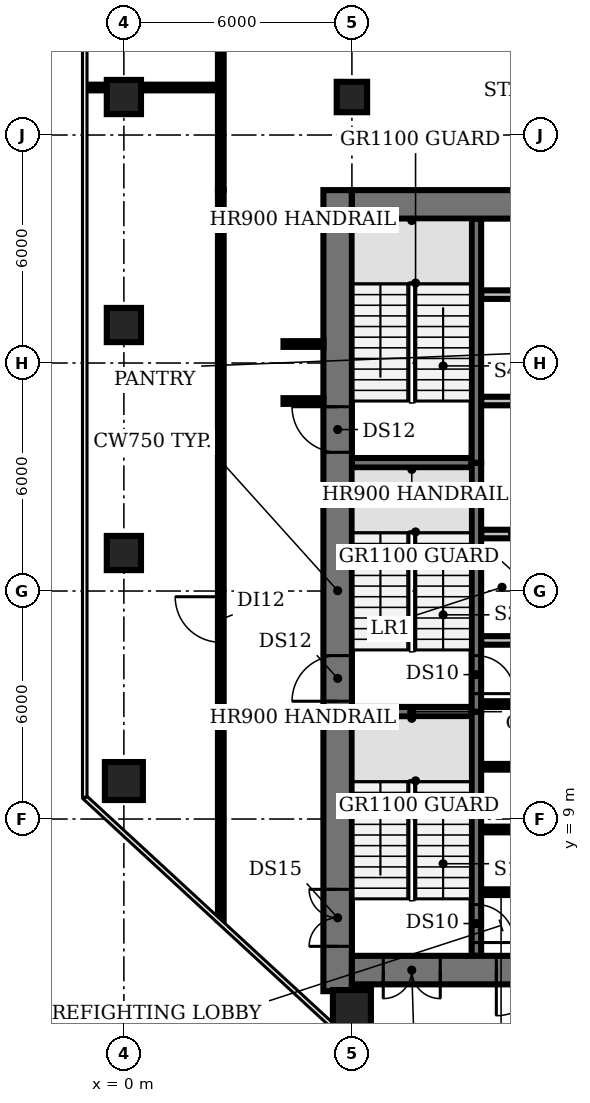
"""IFC4 building model, lengths in metres.
Left out: names, types, materials, properties, quantities, classifications, styles, units other than length and angle.
Written with IfcOpenShell. Run it as: python <this file> out.ifc"""

import sys

from ifc_helpers import new_model, si_unit, direction, frame, frame_2d, origin, origin_2d, place, context, subcontext, project, spatial, rectangle, circle, extrude, element, fill, save


model = new_model("IFC4")
c1 = context("Model", 3, precision=1e-05, world=origin(), true_north=direction((0.0, 1.0)))
c2 = subcontext(c1, "Body", "Model", "MODEL_VIEW")
j1 = project(units=[si_unit("LENGTHUNIT", "METRE"), si_unit("PLANEANGLEUNIT", "RADIAN")], contexts=[c1])
p1 = place(None, origin())
s1 = spatial("IfcSite", under=j1, at=p1, CompositionType="ELEMENT")
p2 = place(p1, origin())
s2 = spatial("IfcBuilding", under=s1, at=p2, CompositionType="ELEMENT")
p3 = place(p2, frame((0.0, 0.0, 100.4)))
s3 = spatial("IfcBuildingStorey", under=s2, at=p3, CompositionType="ELEMENT", Elevation=100.4)
p4 = place(p3, frame((0.0, 10.0, 0.0), z_axis=(0.0, 0.0, 1.0), x_axis=(1.0, 0.0, 0.0)))
e1 = element("IfcColumn", 1, at=p4, inside=s3, PredefinedType="COLUMN", context=c2, shape_type="SweptSolid", body=[
    extrude(circle(Radius=0.5, at=origin_2d()), origin(), (0.0, 0.0, 1.0), 3.85),
])
for number, where, z_axis, x_axis in (
    (2, (0.0, 16.0, 0.0), (0.0, 0.0, 1.0), (1.0, 0.0, 0.0)),
    (3, (0.0, 22.0, 0.0), (0.0, 0.0, 1.0), (1.0, 0.0, 0.0)),
    (4, (0.0, 28.0, 0.0), (0.0, 0.0, 1.0), (1.0, 0.0, 0.0)),
):
    element("IfcColumn", number, at=place(p3, frame(where, z_axis=z_axis, x_axis=x_axis)), inside=s3, PredefinedType="COLUMN", context=c2, shape_type="SweptSolid", body=[
        extrude(rectangle(XDim=0.9, YDim=0.9, at=origin_2d()), origin(), (0.0, 0.0, 1.0), 3.85),
    ])
p5 = place(p3, frame((6.0, 4.0, 0.0), z_axis=(0.0, 0.0, 1.0), x_axis=(1.0, 0.0, 0.0)))
e5 = element("IfcColumn", 5, at=p5, inside=s3, PredefinedType="COLUMN", context=c2, shape_type="SweptSolid", body=[
    extrude(circle(Radius=0.5, at=origin_2d()), origin(), (0.0, 0.0, 1.0), 3.85),
])
p6 = place(p3, frame((6.0, 28.0, 0.0), z_axis=(0.0, 0.0, 1.0), x_axis=(1.0, 0.0, 0.0)))
e6 = element("IfcColumn", 6, at=p6, inside=s3, PredefinedType="COLUMN", context=c2, shape_type="SweptSolid", body=[
    extrude(rectangle(XDim=0.8, YDim=0.8, at=origin_2d()), origin(), (0.0, 0.0, 1.0), 3.85),
])
for number, where, z_axis, x_axis in (
    (7, (9.4, 7.075, 0.0), (0.0, 0.0, 1.0), (1.0, 0.0, 0.0)),
    (8, (9.4, 8.725, 0.0), (0.0, 0.0, 1.0), (1.0, 0.0, 0.0)),
    (9, (9.4, 10.375, 0.0), (0.0, 0.0, 1.0), (1.0, 0.0, 0.0)),
):
    element("IfcWall", number, at=place(p3, frame(where, z_axis=z_axis, x_axis=x_axis)), inside=s3, PredefinedType="SHEAR", context=c2, shape_type="SweptSolid", body=[
        extrude(rectangle(XDim=1.05, YDim=0.15, at=frame_2d((0.525, 0.0))), origin(), (0.0, 0.0, 1.0), 3.85),
    ])
p7 = place(p3, frame((6.0, 11.825, 0.0), z_axis=(0.0, 0.0, 1.0), x_axis=(1.0, 0.0, 0.0)))
e10 = element("IfcWall", 10, at=p7, inside=s3, PredefinedType="SHEAR", context=c2, shape_type="SweptSolid", body=[
    extrude(rectangle(XDim=3.15, YDim=0.25, at=frame_2d((1.575, 0.0))), origin(), (0.0, 0.0, 1.0), 3.85),
])
p8 = place(p3, frame((9.4, 12.025, 0.0), z_axis=(0.0, 0.0, 1.0), x_axis=(1.0, 0.0, 0.0)))
e11 = element("IfcWall", 11, at=p8, inside=s3, PredefinedType="SHEAR", context=c2, shape_type="SweptSolid", body=[
    extrude(rectangle(XDim=1.05, YDim=0.15, at=frame_2d((0.525, 0.0))), origin(), (0.0, 0.0, 1.0), 3.85),
])
p9 = place(p3, frame((9.4, 13.7, 0.0), z_axis=(0.0, 0.0, 1.0), x_axis=(1.0, 0.0, 0.0)))
e12 = element("IfcWall", 12, at=p9, inside=s3, PredefinedType="PARTITIONING", context=c2, shape_type="SweptSolid", body=[
    extrude(rectangle(XDim=4.0, YDim=0.225, at=frame_2d((2.0, 0.0))), origin(), (0.0, 0.0, 1.0), 3.85),
])
p10 = place(p3, frame((9.4, 16.5, 0.0), z_axis=(0.0, 0.0, 1.0), x_axis=(1.0, 0.0, 0.0)))
e13 = element("IfcWall", 13, at=p10, inside=s3, PredefinedType="PARTITIONING", context=c2, shape_type="SweptSolid", body=[
    extrude(rectangle(XDim=14.6, YDim=0.225, at=frame_2d((7.3, 0.0))), origin(), (0.0, 0.0, 1.0), 3.85),
])
p11 = place(p10, frame((0.75, 0.0, 0.0)))
e14 = element("IfcOpeningElement", 14, at=p11, cuts=e13, PredefinedType="OPENING", context=c2, shape_type="SweptSolid", body=[
    extrude(rectangle(XDim=1.1, YDim=2.1, at=frame_2d((0.55, 1.05))), frame((0.0, 0.123, 0.0), z_axis=(0.0, -1.0, 0.0), x_axis=(1.0, 0.0, 0.0)), (0.0, 0.0, 1.0), 0.245),
])
p12 = place(p10, frame((3.55, 0.0, 0.0)))
e15 = element("IfcOpeningElement", 15, at=p12, cuts=e13, PredefinedType="OPENING", context=c2, shape_type="SweptSolid", body=[
    extrude(rectangle(XDim=1.1, YDim=2.1, at=frame_2d((0.55, 1.05))), frame((0.0, 0.123, 0.0), z_axis=(0.0, -1.0, 0.0), x_axis=(1.0, 0.0, 0.0)), (0.0, 0.0, 1.0), 0.245),
])
p13 = place(p10, frame((6.35, 0.0, 0.0)))
e16 = element("IfcOpeningElement", 16, at=p13, cuts=e13, PredefinedType="OPENING", context=c2, shape_type="SweptSolid", body=[
    extrude(rectangle(XDim=1.1, YDim=2.1, at=frame_2d((0.55, 1.05))), frame((0.0, 0.123, 0.0), z_axis=(0.0, -1.0, 0.0), x_axis=(1.0, 0.0, 0.0)), (0.0, 0.0, 1.0), 0.245),
])
p14 = place(p10, frame((9.15, 0.0, 0.0)))
e17 = element("IfcOpeningElement", 17, at=p14, cuts=e13, PredefinedType="OPENING", context=c2, shape_type="SweptSolid", body=[
    extrude(rectangle(XDim=1.1, YDim=2.1, at=frame_2d((0.55, 1.05))), frame((0.0, 0.123, 0.0), z_axis=(0.0, -1.0, 0.0), x_axis=(1.0, 0.0, 0.0)), (0.0, 0.0, 1.0), 0.245),
])
p15 = place(p10, frame((11.647, 0.0, 0.0)))
e18 = element("IfcOpeningElement", 18, at=p15, cuts=e13, PredefinedType="OPENING", context=c2, shape_type="SweptSolid", body=[
    extrude(rectangle(XDim=0.9, YDim=2.1, at=frame_2d((0.45, 1.05))), frame((0.0, 0.123, 0.0), z_axis=(0.0, -1.0, 0.0), x_axis=(1.0, 0.0, 0.0)), (0.0, 0.0, 1.0), 0.245),
])
p16 = place(p10, frame((13.423, 0.0, 0.0)))
e19 = element("IfcOpeningElement", 19, at=p16, cuts=e13, PredefinedType="OPENING", context=c2, shape_type="SweptSolid", body=[
    extrude(rectangle(XDim=0.9, YDim=2.1, at=frame_2d((0.45, 1.05))), frame((0.0, 0.123, 0.0), z_axis=(0.0, -1.0, 0.0), x_axis=(1.0, 0.0, 0.0)), (0.0, 0.0, 1.0), 0.245),
])
p17 = place(p3, frame((6.0, 18.375, 0.0), z_axis=(0.0, 0.0, 1.0), x_axis=(1.0, 0.0, 0.0)))
e20 = element("IfcWall", 20, at=p17, inside=s3, PredefinedType="SHEAR", context=c2, shape_type="SweptSolid", body=[
    extrude(rectangle(XDim=3.15, YDim=0.25, at=frame_2d((1.575, 0.0))), origin(), (0.0, 0.0, 1.0), 3.85),
])
p18 = place(p3, frame((24.0, 20.0, 0.0), z_axis=(0.0, 0.0, 1.0), x_axis=(-1.0, 0.0, 0.0)))
e21 = element("IfcWall", 21, at=p18, inside=s3, PredefinedType="PARTITIONING", context=c2, shape_type="SweptSolid", body=[
    extrude(rectangle(XDim=14.6, YDim=0.225, at=frame_2d((7.3, 0.0))), origin(), (0.0, 0.0, 1.0), 3.85),
])
p19 = place(p18, frame((12.9, 0.0, 0.0)))
e22 = element("IfcOpeningElement", 22, at=p19, cuts=e21, PredefinedType="OPENING", context=c2, shape_type="SweptSolid", body=[
    extrude(rectangle(XDim=0.9, YDim=2.1, at=frame_2d((0.45, 1.05))), frame((0.0, 0.123, 0.0), z_axis=(0.0, -1.0, 0.0), x_axis=(1.0, 0.0, 0.0)), (0.0, 0.0, 1.0), 0.245),
])
p20 = place(p18, frame((9.475, 0.0, 0.0)))
e23 = element("IfcOpeningElement", 23, at=p20, cuts=e21, PredefinedType="OPENING", context=c2, shape_type="SweptSolid", body=[
    extrude(rectangle(XDim=1.0, YDim=2.1, at=frame_2d((0.5, 1.05))), frame((0.0, 0.123, 0.0), z_axis=(0.0, -1.0, 0.0), x_axis=(1.0, 0.0, 0.0)), (0.0, 0.0, 1.0), 0.245),
])
p21 = place(p18, frame((6.375, 0.0, 0.0)))
e24 = element("IfcOpeningElement", 24, at=p21, cuts=e21, PredefinedType="OPENING", context=c2, shape_type="SweptSolid", body=[
    extrude(rectangle(XDim=0.9, YDim=2.1, at=frame_2d((0.45, 1.05))), frame((0.0, 0.123, 0.0), z_axis=(0.0, -1.0, 0.0), x_axis=(1.0, 0.0, 0.0)), (0.0, 0.0, 1.0), 0.245),
])
p22 = place(p18, frame((4.175, 0.0, 0.0)))
e25 = element("IfcOpeningElement", 25, at=p22, cuts=e21, PredefinedType="OPENING", context=c2, shape_type="SweptSolid", body=[
    extrude(rectangle(XDim=0.9, YDim=2.1, at=frame_2d((0.45, 1.05))), frame((0.0, 0.123, 0.0), z_axis=(0.0, -1.0, 0.0), x_axis=(1.0, 0.0, 0.0)), (0.0, 0.0, 1.0), 0.245),
])
p23 = place(p18, frame((2.137, 0.0, 0.0)))
e26 = element("IfcOpeningElement", 26, at=p23, cuts=e21, PredefinedType="OPENING", context=c2, shape_type="SweptSolid", body=[
    extrude(rectangle(XDim=0.9, YDim=2.1, at=frame_2d((0.45, 1.05))), frame((0.0, 0.123, 0.0), z_axis=(0.0, -1.0, 0.0), x_axis=(1.0, 0.0, 0.0)), (0.0, 0.0, 1.0), 0.245),
])
p24 = place(p18, frame((0.363, 0.0, 0.0)))
e27 = element("IfcOpeningElement", 27, at=p24, cuts=e21, PredefinedType="OPENING", context=c2, shape_type="SweptSolid", body=[
    extrude(rectangle(XDim=0.9, YDim=2.1, at=frame_2d((0.45, 1.05))), frame((0.0, 0.123, 0.0), z_axis=(0.0, -1.0, 0.0), x_axis=(1.0, 0.0, 0.0)), (0.0, 0.0, 1.0), 0.245),
])
p25 = place(p3, frame((9.4, 22.8, 0.0), z_axis=(0.0, 0.0, 1.0), x_axis=(1.0, 0.0, 0.0)))
e28 = element("IfcWall", 28, at=p25, inside=s3, PredefinedType="PARTITIONING", context=c2, shape_type="SweptSolid", body=[
    extrude(rectangle(XDim=14.6, YDim=0.225, at=frame_2d((7.3, 0.0))), origin(), (0.0, 0.0, 1.0), 3.85),
])
p26 = place(p3, frame((9.275, 11.825, 0.0), z_axis=(0.0, 0.0, 1.0), x_axis=(0.0, -1.0, 0.0)))
e29 = element("IfcWall", 29, at=p26, inside=s3, PredefinedType="SHEAR", context=c2, shape_type="SweptSolid", body=[
    extrude(rectangle(XDim=6.425, YDim=0.25, at=frame_2d((3.212, 0.0))), origin(), (0.0, 0.0, 1.0), 3.85),
])
p27 = place(p26, frame((5.075, 0.0, 0.0)))
e30 = element("IfcOpeningElement", 30, at=p27, cuts=e29, PredefinedType="OPENING", context=c2, shape_type="SweptSolid", body=[
    extrude(rectangle(XDim=1.0, YDim=2.1, at=frame_2d((0.5, 1.05))), frame((0.0, 0.135, 0.0), z_axis=(0.0, -1.0, 0.0), x_axis=(1.0, 0.0, 0.0)), (0.0, 0.0, 1.0), 0.27),
])
p28 = place(p3, frame((9.275, 18.375, 0.0), z_axis=(0.0, 0.0, 1.0), x_axis=(0.0, -1.0, 0.0)))
e31 = element("IfcWall", 31, at=p28, inside=s3, PredefinedType="SHEAR", context=c2, shape_type="SweptSolid", body=[
    extrude(rectangle(XDim=6.55, YDim=0.25, at=frame_2d((3.275, 0.0))), origin(), (0.0, 0.0, 1.0), 3.85),
])
p29 = place(p28, frame((5.075, 0.0, 0.0)))
e32 = element("IfcOpeningElement", 32, at=p29, cuts=e31, PredefinedType="OPENING", context=c2, shape_type="SweptSolid", body=[
    extrude(rectangle(XDim=1.0, YDim=2.1, at=frame_2d((0.5, 1.05))), frame((0.0, 0.135, 0.0), z_axis=(0.0, -1.0, 0.0), x_axis=(1.0, 0.0, 0.0)), (0.0, 0.0, 1.0), 0.27),
])
p30 = place(p3, frame((9.275, 18.375, 0.0), z_axis=(0.0, 0.0, 1.0), x_axis=(0.0, 1.0, 0.0)))
e33 = element("IfcWall", 33, at=p30, inside=s3, PredefinedType="SHEAR", context=c2, shape_type="SweptSolid", body=[
    extrude(rectangle(XDim=6.425, YDim=0.25, at=frame_2d((3.212, 0.0))), origin(), (0.0, 0.0, 1.0), 3.85),
])
p31 = place(p3, frame((5.625, 4.47, 0.0), z_axis=(0.0, 0.0, 1.0), x_axis=(0.0, 1.0, 0.0)))
e34 = element("IfcWall", 34, at=p31, inside=s3, PredefinedType="SHEAR", context=c2, shape_type="SweptSolid", body=[
    extrude(rectangle(XDim=21.08, YDim=0.75, at=frame_2d((10.54, 0.0))), origin(), (0.0, 0.0, 1.0), 3.85),
])
p32 = place(p31, frame((1.18, 0.0, 0.0)))
e35 = element("IfcOpeningElement", 35, at=p32, cuts=e34, PredefinedType="OPENING", context=c2, shape_type="SweptSolid", body=[
    extrude(rectangle(XDim=1.5, YDim=2.1, at=frame_2d((0.75, 1.05))), frame((0.0, 0.385, 0.0), z_axis=(0.0, -1.0, 0.0), x_axis=(1.0, 0.0, 0.0)), (0.0, 0.0, 1.0), 0.77),
])
p33 = place(p31, frame((7.63, 0.0, 0.0)))
e36 = element("IfcOpeningElement", 36, at=p33, cuts=e34, PredefinedType="OPENING", context=c2, shape_type="SweptSolid", body=[
    extrude(rectangle(XDim=1.2, YDim=2.1, at=frame_2d((0.6, 1.05))), frame((0.0, 0.385, 0.0), z_axis=(0.0, -1.0, 0.0), x_axis=(1.0, 0.0, 0.0)), (0.0, 0.0, 1.0), 0.77),
])
p34 = place(p31, frame((14.18, 0.0, 0.0)))
e37 = element("IfcOpeningElement", 37, at=p34, cuts=e34, PredefinedType="OPENING", context=c2, shape_type="SweptSolid", body=[
    extrude(rectangle(XDim=1.2, YDim=2.1, at=frame_2d((0.6, 1.05))), frame((0.0, 0.385, 0.0), z_axis=(0.0, -1.0, 0.0), x_axis=(1.0, 0.0, 0.0)), (0.0, 0.0, 1.0), 0.77),
])
p35 = place(p3, frame((24.0, 5.025, 0.0), z_axis=(0.0, 0.0, 1.0), x_axis=(-1.0, 0.0, 0.0)))
e38 = element("IfcWall", 38, at=p35, inside=s3, PredefinedType="SHEAR", context=c2, shape_type="SweptSolid", body=[
    extrude(rectangle(XDim=18.0, YDim=0.75, at=frame_2d((9.0, 0.0))), origin(), (0.0, 0.0, 1.0), 3.85),
])
p36 = place(p35, frame((0.825, 0.0, 0.0)))
e39 = element("IfcOpeningElement", 39, at=p36, cuts=e38, PredefinedType="OPENING", context=c2, shape_type="SweptSolid", body=[
    extrude(rectangle(XDim=1.5, YDim=2.1, at=frame_2d((0.75, 1.05))), frame((0.0, 0.385, 0.0), z_axis=(0.0, -1.0, 0.0), x_axis=(1.0, 0.0, 0.0)), (0.0, 0.0, 1.0), 0.77),
])
p37 = place(p35, frame((15.675, 0.0, 0.0)))
e40 = element("IfcOpeningElement", 40, at=p37, cuts=e38, PredefinedType="OPENING", context=c2, shape_type="SweptSolid", body=[
    extrude(rectangle(XDim=1.5, YDim=2.1, at=frame_2d((0.75, 1.05))), frame((0.0, 0.385, 0.0), z_axis=(0.0, -1.0, 0.0), x_axis=(1.0, 0.0, 0.0)), (0.0, 0.0, 1.0), 0.77),
])
p38 = place(p35, frame((13.0, 0.0, 0.0)))
e41 = element("IfcOpeningElement", 41, at=p38, cuts=e38, PredefinedType="OPENING", context=c2, shape_type="SweptSolid", body=[
    extrude(rectangle(XDim=1.2, YDim=2.1, at=frame_2d((0.6, 1.05))), frame((0.0, 0.385, 0.0), z_axis=(0.0, -1.0, 0.0), x_axis=(1.0, 0.0, 0.0)), (0.0, 0.0, 1.0), 0.77),
])
p39 = place(p35, frame((4.35, 0.0, 0.0)))
e42 = element("IfcOpeningElement", 42, at=p39, cuts=e38, PredefinedType="OPENING", context=c2, shape_type="SweptSolid", body=[
    extrude(rectangle(XDim=1.0, YDim=2.1, at=frame_2d((0.5, 1.05))), frame((0.0, 0.385, 0.0), z_axis=(0.0, -1.0, 0.0), x_axis=(1.0, 0.0, 0.0)), (0.0, 0.0, 1.0), 0.77),
])
p40 = place(p3, frame((6.0, 25.175, 0.0), z_axis=(0.0, 0.0, 1.0), x_axis=(1.0, 0.0, 0.0)))
e43 = element("IfcWall", 43, at=p40, inside=s3, PredefinedType="SHEAR", context=c2, shape_type="SweptSolid", body=[
    extrude(rectangle(XDim=18.0, YDim=0.75, at=frame_2d((9.0, 0.0))), origin(), (0.0, 0.0, 1.0), 3.85),
])
p41 = place(p3, frame((-0.98, 28.25, 0.0), z_axis=(0.0, 0.0, 1.0), x_axis=(1.0, 0.0, 0.0)))
e44 = element("IfcWall", 44, at=p41, inside=s3, PredefinedType="PARTITIONING", context=c2, shape_type="SweptSolid", body=[
    extrude(rectangle(XDim=3.53, YDim=0.15, at=frame_2d((1.765, 0.0))), origin(), (0.0, 0.0, 1.0), 2.83),
])
p42 = place(p3, frame((2.55, 6.34, 0.0), z_axis=(0.0, 0.0, 1.0), x_axis=(0.0, 1.0, 0.0)))
e45 = element("IfcWall", 45, at=p42, inside=s3, PredefinedType="PARTITIONING", context=c2, shape_type="SweptSolid", body=[
    extrude(rectangle(XDim=19.21, YDim=0.15, at=frame_2d((9.605, 0.0))), origin(), (0.0, 0.0, 1.0), 2.83),
])
p43 = place(p42, frame((7.31, 0.0, 0.0)))
e46 = element("IfcOpeningElement", 46, at=p43, cuts=e45, PredefinedType="OPENING", context=c2, shape_type="SweptSolid", body=[
    extrude(rectangle(XDim=1.2, YDim=2.1, at=frame_2d((0.6, 1.05))), frame((0.0, 0.085, 0.0), z_axis=(0.0, -1.0, 0.0), x_axis=(1.0, 0.0, 0.0)), (0.0, 0.0, 1.0), 0.17),
])
p44 = place(p3, frame((2.55, 25.55, 0.0), z_axis=(0.0, 0.0, 1.0), x_axis=(0.0, 1.0, 0.0)))
e47 = element("IfcWall", 47, at=p44, inside=s3, PredefinedType="PARTITIONING", context=c2, shape_type="SweptSolid", body=[
    extrude(rectangle(XDim=3.9, YDim=0.15, at=frame_2d((1.95, 0.0))), origin(), (0.0, 0.0, 1.0), 2.83),
])
for number, where, z_axis, x_axis in (
    (48, (4.2, 20.0, 0.0), (0.0, 0.0, 1.0), (1.0, 0.0, 0.0)),
    (49, (4.2, 21.5, 0.0), (0.0, 0.0, 1.0), (1.0, 0.0, 0.0)),
):
    element("IfcWall", number, at=place(p3, frame(where, z_axis=z_axis, x_axis=x_axis)), inside=s3, PredefinedType="PARTITIONING", context=c2, shape_type="SweptSolid", body=[
        extrude(rectangle(XDim=1.05, YDim=0.15, at=frame_2d((0.525, 0.0))), origin(), (0.0, 0.0, 1.0), 2.83),
    ])
p45 = place(p27, origin())
e50 = element("IfcDoor", 50, at=p45, inside=s3, OperationType="SINGLE_SWING_RIGHT", PredefinedType="DOOR", context=c2, shape_type="SweptSolid", body=[
    extrude(rectangle(XDim=1.0, YDim=2.1, at=frame_2d((0.5, 1.05))), frame((0.0, 0.025, 0.0), z_axis=(0.0, -1.0, 0.0), x_axis=(1.0, 0.0, 0.0)), (0.0, 0.0, 1.0), 0.05),
])
fill(e30, e50)
p46 = place(p29, origin())
e51 = element("IfcDoor", 51, at=p46, inside=s3, OperationType="SINGLE_SWING_RIGHT", PredefinedType="DOOR", context=c2, shape_type="SweptSolid", body=[
    extrude(rectangle(XDim=1.0, YDim=2.1, at=frame_2d((0.5, 1.05))), frame((0.0, 0.025, 0.0), z_axis=(0.0, -1.0, 0.0), x_axis=(1.0, 0.0, 0.0)), (0.0, 0.0, 1.0), 0.05),
])
fill(e32, e51)
p47 = place(p32, origin())
e52 = element("IfcDoor", 52, at=p47, inside=s3, OperationType="DOUBLE_DOOR_SINGLE_SWING", PredefinedType="DOOR", context=c2, shape_type="SweptSolid", body=[
    extrude(rectangle(XDim=1.5, YDim=2.1, at=frame_2d((0.75, 1.05))), frame((0.0, 0.025, 0.0), z_axis=(0.0, -1.0, 0.0), x_axis=(1.0, 0.0, 0.0)), (0.0, 0.0, 1.0), 0.05),
])
fill(e35, e52)
p48 = place(p33, origin())
e53 = element("IfcDoor", 53, at=p48, inside=s3, OperationType="SINGLE_SWING_LEFT", PredefinedType="DOOR", context=c2, shape_type="SweptSolid", body=[
    extrude(rectangle(XDim=1.2, YDim=2.1, at=frame_2d((0.6, 1.05))), frame((0.0, 0.025, 0.0), z_axis=(0.0, -1.0, 0.0), x_axis=(1.0, 0.0, 0.0)), (0.0, 0.0, 1.0), 0.05),
])
fill(e36, e53)
p49 = place(p34, origin())
e54 = element("IfcDoor", 54, at=p49, inside=s3, OperationType="SINGLE_SWING_RIGHT", PredefinedType="DOOR", context=c2, shape_type="SweptSolid", body=[
    extrude(rectangle(XDim=1.2, YDim=2.1, at=frame_2d((0.6, 1.05))), frame((0.0, 0.025, 0.0), z_axis=(0.0, -1.0, 0.0), x_axis=(1.0, 0.0, 0.0)), (0.0, 0.0, 1.0), 0.05),
])
fill(e37, e54)
p50 = place(p37, origin())
e55 = element("IfcDoor", 55, at=p50, inside=s3, OperationType="DOUBLE_DOOR_SINGLE_SWING", PredefinedType="DOOR", context=c2, shape_type="SweptSolid", body=[
    extrude(rectangle(XDim=1.5, YDim=2.1, at=frame_2d((0.75, 1.05))), frame((0.0, 0.025, 0.0), z_axis=(0.0, -1.0, 0.0), x_axis=(1.0, 0.0, 0.0)), (0.0, 0.0, 1.0), 0.05),
])
fill(e40, e55)
p51 = place(p38, origin())
e56 = element("IfcDoor", 56, at=p51, inside=s3, OperationType="SINGLE_SWING_RIGHT", PredefinedType="DOOR", context=c2, shape_type="SweptSolid", body=[
    extrude(rectangle(XDim=1.2, YDim=2.1, at=frame_2d((0.6, 1.05))), frame((0.0, 0.025, 0.0), z_axis=(0.0, -1.0, 0.0), x_axis=(1.0, 0.0, 0.0)), (0.0, 0.0, 1.0), 0.05),
])
fill(e41, e56)
p52 = place(p43, origin())
e57 = element("IfcDoor", 57, at=p52, inside=s3, OperationType="SINGLE_SWING_RIGHT", PredefinedType="DOOR", context=c2, shape_type="SweptSolid", body=[
    extrude(rectangle(XDim=1.2, YDim=2.1, at=frame_2d((0.6, 1.05))), frame((0.0, 0.025, 0.0), z_axis=(0.0, -1.0, 0.0), x_axis=(1.0, 0.0, 0.0)), (0.0, 0.0, 1.0), 0.05),
])
fill(e46, e57)
save(model, sys.argv[1])
